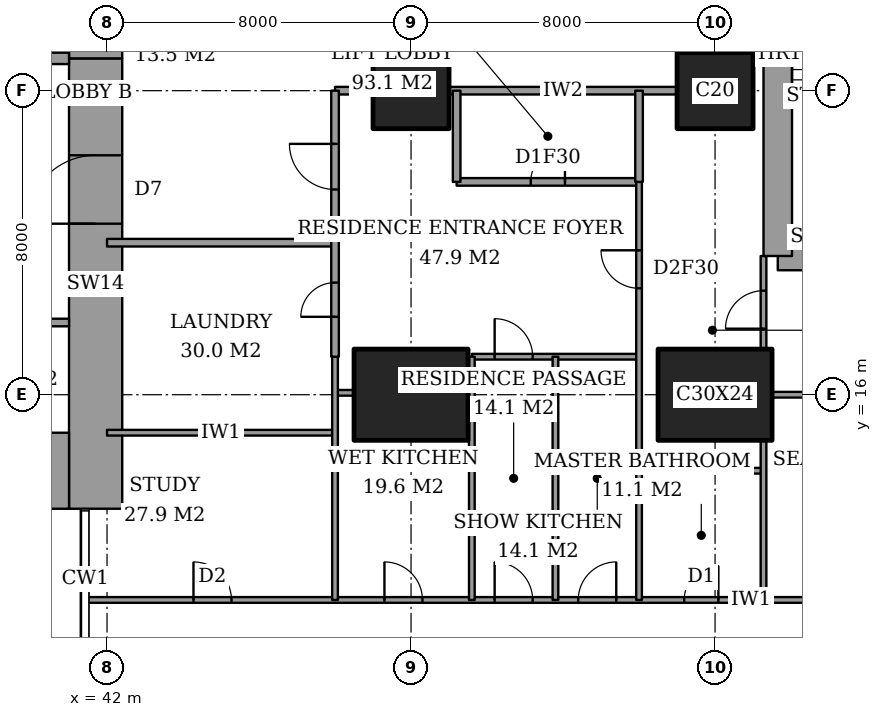
"""IFC4 building model, lengths in metres.
Left out: names, types, materials, properties, quantities, classifications, styles, units other than length and angle.
Written with IfcOpenShell. Run it as: python <this file> out.ifc"""

import sys

from ifc_helpers import new_model, si_unit, direction, frame, frame_2d, origin, origin_2d, place, context, subcontext, project, spatial, rectangle, extrude, element, fill, save


model = new_model("IFC4")
c1 = context("Model", 3, precision=1e-05, world=origin(), true_north=direction((0.0, 1.0)))
c2 = subcontext(c1, "Body", "Model", "MODEL_VIEW")
j1 = project(units=[si_unit("LENGTHUNIT", "METRE"), si_unit("PLANEANGLEUNIT", "RADIAN")], contexts=[c1])
p1 = place(None, origin())
s1 = spatial("IfcSite", under=j1, at=p1, CompositionType="ELEMENT")
p2 = place(p1, origin())
s2 = spatial("IfcBuilding", under=s1, at=p2, CompositionType="ELEMENT")
p3 = place(p2, frame((0.0, 0.0, 69.2)))
s3 = spatial("IfcBuildingStorey", under=s2, at=p3, CompositionType="ELEMENT", Elevation=69.2)
p4 = place(p3, frame((50.0, 16.0, 0.0), z_axis=(0.0, 0.0, 1.0), x_axis=(1.0, 0.0, 0.0)))
e1 = element("IfcColumn", 1, at=p4, inside=s3, PredefinedType="COLUMN", context=c2, shape_type="SweptSolid", body=[
    extrude(rectangle(XDim=3.0, YDim=2.4, at=origin_2d()), origin(), (0.0, 0.0, 1.0), 3.6),
])
p5 = place(p3, frame((50.0, 24.0, 0.0), z_axis=(0.0, 0.0, 1.0), x_axis=(1.0, 0.0, 0.0)))
e2 = element("IfcColumn", 2, at=p5, inside=s3, PredefinedType="COLUMN", context=c2, shape_type="SweptSolid", body=[
    extrude(rectangle(XDim=2.0, YDim=2.0, at=origin_2d()), origin(), (0.0, 0.0, 1.0), 3.6),
])
p6 = place(p3, frame((58.0, 16.0, 0.0), z_axis=(0.0, 0.0, 1.0), x_axis=(1.0, 0.0, 0.0)))
e3 = element("IfcColumn", 3, at=p6, inside=s3, PredefinedType="COLUMN", context=c2, shape_type="SweptSolid", body=[
    extrude(rectangle(XDim=3.0, YDim=2.4, at=origin_2d()), origin(), (0.0, 0.0, 1.0), 3.6),
])
p7 = place(p3, frame((58.0, 24.0, 0.0), z_axis=(0.0, 0.0, 1.0), x_axis=(1.0, 0.0, 0.0)))
e4 = element("IfcColumn", 4, at=p7, inside=s3, PredefinedType="COLUMN", context=c2, shape_type="SweptSolid", body=[
    extrude(rectangle(XDim=2.0, YDim=2.0, at=origin_2d()), origin(), (0.0, 0.0, 1.0), 3.6),
])
p8 = place(p3, frame((37.85, 14.0, 0.0), z_axis=(0.0, 0.0, 1.0), x_axis=(1.0, 0.0, 0.0)))
e5 = element("IfcWall", 5, at=p8, inside=s3, PredefinedType="SHEAR", context=c2, shape_type="SweptSolid", body=[
    extrude(rectangle(XDim=3.15, YDim=2.0, at=frame_2d((1.575, 0.0))), origin(), (0.0, 0.0, 1.0), 3.6),
])
p9 = place(p3, frame((41.7, 13.0, 0.0), z_axis=(0.0, 0.0, 1.0), x_axis=(0.0, 1.0, 0.0)))
e6 = element("IfcWall", 6, at=p9, inside=s3, PredefinedType="SHEAR", context=c2, shape_type="SweptSolid", body=[
    extrude(rectangle(XDim=11.85, YDim=1.4, at=frame_2d((5.925, 0.0))), origin(), (0.0, 0.0, 1.0), 3.6),
])
p10 = place(p9, frame((7.5, 0.0, 0.0)))
e7 = element("IfcOpeningElement", 7, at=p10, cuts=e6, PredefinedType="OPENING", context=c2, shape_type="SweptSolid", body=[
    extrude(rectangle(XDim=1.8, YDim=2.4, at=frame_2d((0.9, 1.2))), frame((0.0, 0.71, 0.0), z_axis=(0.0, -1.0, 0.0), x_axis=(1.0, 0.0, 0.0)), (0.0, 0.0, 1.0), 1.42),
])
p11 = place(p3, frame((41.7, 24.85, 0.0), z_axis=(0.0, 0.0, 1.0), x_axis=(0.0, 1.0, 0.0)))
e8 = element("IfcWall", 8, at=p11, inside=s3, PredefinedType="SHEAR", context=c2, shape_type="SweptSolid", body=[
    extrude(rectangle(XDim=10.15, YDim=1.4, at=frame_2d((5.075, 0.0))), origin(), (0.0, 0.0, 1.0), 3.6),
])
p12 = place(p3, frame((37.85, 24.85, 0.0), z_axis=(0.0, 0.0, 1.0), x_axis=(1.0, 0.0, 0.0)))
e9 = element("IfcWall", 9, at=p12, inside=s3, PredefinedType="SHEAR", context=c2, shape_type="SweptSolid", body=[
    extrude(rectangle(XDim=3.15, YDim=0.3, at=frame_2d((1.575, 0.0))), origin(), (0.0, 0.0, 1.0), 3.6),
])
p13 = place(p12, frame((0.95, 0.0, 0.0)))
e10 = element("IfcOpeningElement", 10, at=p13, cuts=e9, PredefinedType="OPENING", context=c2, shape_type="SweptSolid", body=[
    extrude(rectangle(XDim=1.0, YDim=2.1, at=frame_2d((0.5, 1.05))), frame((0.0, 0.16, 0.0), z_axis=(0.0, -1.0, 0.0), x_axis=(1.0, 0.0, 0.0)), (0.0, 0.0, 1.0), 0.32),
])
p14 = place(p3, frame((59.65, 19.65, 0.0), z_axis=(0.0, 0.0, 1.0), x_axis=(1.0, 0.0, 0.0)))
e11 = element("IfcWall", 11, at=p14, inside=s3, PredefinedType="SHEAR", context=c2, shape_type="SweptSolid", body=[
    extrude(rectangle(XDim=4.45, YDim=0.75, at=frame_2d((2.225, 0.0))), origin(), (0.0, 0.0, 1.0), 3.6),
])
p15 = place(p3, frame((59.65, 28.35, 0.0), z_axis=(0.0, 0.0, 1.0), x_axis=(0.0, -1.0, 0.0)))
e12 = element("IfcWall", 12, at=p15, inside=s3, PredefinedType="SHEAR", context=c2, shape_type="SweptSolid", body=[
    extrude(rectangle(XDim=8.7, YDim=0.75, at=frame_2d((4.35, 0.0))), origin(), (0.0, 0.0, 1.0), 3.6),
])
p16 = place(p15, frame((0.975, 0.0, 0.0)))
e13 = element("IfcOpeningElement", 13, at=p16, cuts=e12, PredefinedType="OPENING", context=c2, shape_type="SweptSolid", body=[
    extrude(rectangle(XDim=1.0, YDim=2.1, at=frame_2d((0.5, 1.05))), frame((0.0, 0.385, 0.0), z_axis=(0.0, -1.0, 0.0), x_axis=(1.0, 0.0, 0.0)), (0.0, 0.0, 1.0), 0.77),
])
p17 = place(p3, frame((41.439, 10.6, 0.0), z_axis=(0.0, 0.0, 1.0), x_axis=(1.0, 0.0, 0.0)))
e14 = element("IfcWall", 14, at=p17, inside=s3, PredefinedType="PARTITIONING", context=c2, shape_type="SweptSolid", body=[
    extrude(rectangle(XDim=25.011, YDim=0.15, at=frame_2d((12.505, 0.0))), origin(), (0.0, 0.0, 1.0), 3.35),
])
p18 = place(p17, frame((10.761, 0.0, 0.0)))
e15 = element("IfcOpeningElement", 15, at=p18, cuts=e14, PredefinedType="OPENING", context=c2, shape_type="SweptSolid", body=[
    extrude(rectangle(XDim=1.0, YDim=2.1, at=frame_2d((0.5, 1.05))), frame((0.0, 0.085, 0.0), z_axis=(0.0, -1.0, 0.0), x_axis=(1.0, 0.0, 0.0)), (0.0, 0.0, 1.0), 0.17),
])
p19 = place(p17, frame((20.924, 0.0, 0.0)))
e16 = element("IfcOpeningElement", 16, at=p19, cuts=e14, PredefinedType="OPENING", context=c2, shape_type="SweptSolid", body=[
    extrude(rectangle(XDim=1.0, YDim=2.1, at=frame_2d((0.5, 1.05))), frame((0.0, 0.085, 0.0), z_axis=(0.0, -1.0, 0.0), x_axis=(1.0, 0.0, 0.0)), (0.0, 0.0, 1.0), 0.17),
])
p20 = place(p17, frame((15.749, 0.0, 0.0)))
e17 = element("IfcOpeningElement", 17, at=p20, cuts=e14, PredefinedType="OPENING", context=c2, shape_type="SweptSolid", body=[
    extrude(rectangle(XDim=0.9, YDim=2.1, at=frame_2d((0.45, 1.05))), frame((0.0, 0.085, 0.0), z_axis=(0.0, -1.0, 0.0), x_axis=(1.0, 0.0, 0.0)), (0.0, 0.0, 1.0), 0.17),
])
p21 = place(p17, frame((12.961, 0.0, 0.0)))
e18 = element("IfcOpeningElement", 18, at=p21, cuts=e14, PredefinedType="OPENING", context=c2, shape_type="SweptSolid", body=[
    extrude(rectangle(XDim=1.0, YDim=2.1, at=frame_2d((0.5, 1.05))), frame((0.0, 0.085, 0.0), z_axis=(0.0, -1.0, 0.0), x_axis=(1.0, 0.0, 0.0)), (0.0, 0.0, 1.0), 0.17),
])
p22 = place(p17, frame((7.861, 0.0, 0.0)))
e19 = element("IfcOpeningElement", 19, at=p22, cuts=e14, PredefinedType="OPENING", context=c2, shape_type="SweptSolid", body=[
    extrude(rectangle(XDim=1.0, YDim=2.1, at=frame_2d((0.5, 1.05))), frame((0.0, 0.085, 0.0), z_axis=(0.0, -1.0, 0.0), x_axis=(1.0, 0.0, 0.0)), (0.0, 0.0, 1.0), 0.17),
])
p23 = place(p17, frame((2.836, 0.0, 0.0)))
e20 = element("IfcOpeningElement", 20, at=p23, cuts=e14, PredefinedType="OPENING", context=c2, shape_type="SweptSolid", body=[
    extrude(rectangle(XDim=1.0, YDim=2.1, at=frame_2d((0.5, 1.05))), frame((0.0, 0.085, 0.0), z_axis=(0.0, -1.0, 0.0), x_axis=(1.0, 0.0, 0.0)), (0.0, 0.0, 1.0), 0.17),
])
p24 = place(p3, frame((56.0, 14.0, 0.0), z_axis=(0.0, 0.0, 1.0), x_axis=(1.0, 0.0, 0.0)))
e21 = element("IfcWall", 21, at=p24, inside=s3, PredefinedType="PARTITIONING", context=c2, shape_type="SweptSolid", body=[
    extrude(rectangle(XDim=3.275, YDim=0.15, at=frame_2d((1.637, 0.0))), origin(), (0.0, 0.0, 1.0), 3.35),
])
p25 = place(p3, frame((42.0, 15.0, 0.0), z_axis=(0.0, 0.0, 1.0), x_axis=(1.0, 0.0, 0.0)))
e22 = element("IfcWall", 22, at=p25, inside=s3, PredefinedType="PARTITIONING", context=c2, shape_type="SweptSolid", body=[
    extrude(rectangle(XDim=6.0, YDim=0.15, at=frame_2d((3.0, 0.0))), origin(), (0.0, 0.0, 1.0), 3.35),
])
p26 = place(p3, frame((59.5, 16.0, 0.0), z_axis=(0.0, 0.0, 1.0), x_axis=(1.0, 0.0, 0.0)))
e23 = element("IfcWall", 23, at=p26, inside=s3, PredefinedType="PARTITIONING", context=c2, shape_type="SweptSolid", body=[
    extrude(rectangle(XDim=5.15, YDim=0.15, at=frame_2d((2.575, 0.0))), origin(), (0.0, 0.0, 1.0), 2.634),
])
p27 = place(p3, frame((48.0, 16.05, 0.0), z_axis=(0.0, 0.0, 1.0), x_axis=(1.0, 0.0, 0.0)))
e24 = element("IfcWall", 24, at=p27, inside=s3, PredefinedType="PARTITIONING", context=c2, shape_type="SweptSolid", body=[
    extrude(rectangle(XDim=0.5, YDim=0.15, at=frame_2d((0.25, 0.0))), origin(), (0.0, 0.0, 1.0), 2.634),
])
p28 = place(p3, frame((51.6, 17.0, 0.0), z_axis=(0.0, 0.0, 1.0), x_axis=(1.0, 0.0, 0.0)))
e25 = element("IfcWall", 25, at=p28, inside=s3, PredefinedType="PARTITIONING", context=c2, shape_type="SweptSolid", body=[
    extrude(rectangle(XDim=4.4, YDim=0.15, at=frame_2d((2.2, 0.0))), origin(), (0.0, 0.0, 1.0), 3.35),
])
p29 = place(p28, frame((0.6, 0.0, 0.0)))
e26 = element("IfcOpeningElement", 26, at=p29, cuts=e25, PredefinedType="OPENING", context=c2, shape_type="SweptSolid", body=[
    extrude(rectangle(XDim=1.0, YDim=2.1, at=frame_2d((0.5, 1.05))), frame((0.0, 0.085, 0.0), z_axis=(0.0, -1.0, 0.0), x_axis=(1.0, 0.0, 0.0)), (0.0, 0.0, 1.0), 0.17),
])
p30 = place(p3, frame((42.0, 20.0, 0.0), z_axis=(0.0, 0.0, 1.0), x_axis=(1.0, 0.0, 0.0)))
e27 = element("IfcWall", 27, at=p30, inside=s3, PredefinedType="PARTITIONING", context=c2, shape_type="SweptSolid", body=[
    extrude(rectangle(XDim=6.0, YDim=0.2, at=frame_2d((3.0, 0.0))), origin(), (0.0, 0.0, 1.0), 3.35),
])
p31 = place(p3, frame((51.2, 21.6, 0.0), z_axis=(0.0, 0.0, 1.0), x_axis=(1.0, 0.0, 0.0)))
e28 = element("IfcWall", 28, at=p31, inside=s3, PredefinedType="PARTITIONING", context=c2, shape_type="SweptSolid", body=[
    extrude(rectangle(XDim=4.8, YDim=0.2, at=frame_2d((2.4, 0.0))), origin(), (0.0, 0.0, 1.0), 3.35),
])
p32 = place(p31, frame((1.95, 0.0, 0.0)))
e29 = element("IfcOpeningElement", 29, at=p32, cuts=e28, PredefinedType="OPENING", context=c2, shape_type="SweptSolid", body=[
    extrude(rectangle(XDim=0.9, YDim=2.1, at=frame_2d((0.45, 1.05))), frame((0.0, 0.11, 0.0), z_axis=(0.0, -1.0, 0.0), x_axis=(1.0, 0.0, 0.0)), (0.0, 0.0, 1.0), 0.22),
])
p33 = place(p3, frame((48.0, 24.0, 0.0), z_axis=(0.0, 0.0, 1.0), x_axis=(1.0, 0.0, 0.0)))
e30 = element("IfcWall", 30, at=p33, inside=s3, PredefinedType="PARTITIONING", context=c2, shape_type="SweptSolid", body=[
    extrude(rectangle(XDim=1.0, YDim=0.2, at=frame_2d((0.5, 0.0))), origin(), (0.0, 0.0, 1.0), 3.35),
])
p34 = place(p3, frame((51.0, 24.0, 0.0), z_axis=(0.0, 0.0, 1.0), x_axis=(1.0, 0.0, 0.0)))
e31 = element("IfcWall", 31, at=p34, inside=s3, PredefinedType="PARTITIONING", context=c2, shape_type="SweptSolid", body=[
    extrude(rectangle(XDim=6.0, YDim=0.2, at=frame_2d((3.0, 0.0))), origin(), (0.0, 0.0, 1.0), 3.35),
])
p35 = place(p3, frame((48.0, 17.0, 0.0), z_axis=(0.0, 0.0, 1.0), x_axis=(0.0, 1.0, 0.0)))
e32 = element("IfcWall", 32, at=p35, inside=s3, PredefinedType="PARTITIONING", context=c2, shape_type="SweptSolid", body=[
    extrude(rectangle(XDim=7.0, YDim=0.2, at=frame_2d((3.5, 0.0))), origin(), (0.0, 0.0, 1.0), 3.35),
])
p36 = place(p35, frame((4.4, 0.0, 0.0)))
e33 = element("IfcOpeningElement", 33, at=p36, cuts=e32, PredefinedType="OPENING", context=c2, shape_type="SweptSolid", body=[
    extrude(rectangle(XDim=1.2, YDim=2.4, at=frame_2d((0.6, 1.2))), frame((0.0, 0.11, 0.0), z_axis=(0.0, -1.0, 0.0), x_axis=(1.0, 0.0, 0.0)), (0.0, 0.0, 1.0), 0.22),
])
p37 = place(p35, frame((1.05, 0.0, 0.0)))
e34 = element("IfcOpeningElement", 34, at=p37, cuts=e32, PredefinedType="OPENING", context=c2, shape_type="SweptSolid", body=[
    extrude(rectangle(XDim=0.9, YDim=2.1, at=frame_2d((0.45, 1.05))), frame((0.0, 0.11, 0.0), z_axis=(0.0, -1.0, 0.0), x_axis=(1.0, 0.0, 0.0)), (0.0, 0.0, 1.0), 0.22),
])
p38 = place(p3, frame((48.0, 10.6, 0.0), z_axis=(0.0, 0.0, 1.0), x_axis=(0.0, 1.0, 0.0)))
e35 = element("IfcWall", 35, at=p38, inside=s3, PredefinedType="PARTITIONING", context=c2, shape_type="SweptSolid", body=[
    extrude(rectangle(XDim=6.4, YDim=0.15, at=frame_2d((3.2, 0.0))), origin(), (0.0, 0.0, 1.0), 3.35),
])
p39 = place(p3, frame((51.2, 21.6, 0.0), z_axis=(0.0, 0.0, 1.0), x_axis=(0.0, 1.0, 0.0)))
e36 = element("IfcWall", 36, at=p39, inside=s3, PredefinedType="PARTITIONING", context=c2, shape_type="SweptSolid", body=[
    extrude(rectangle(XDim=2.4, YDim=0.2, at=frame_2d((1.2, 0.0))), origin(), (0.0, 0.0, 1.0), 3.35),
])
for number, where, z_axis, x_axis in (
    (37, (51.6, 10.6, 0.0), (0.0, 0.0, 1.0), (0.0, 1.0, 0.0)),
    (38, (53.8, 10.6, 0.0), (0.0, 0.0, 1.0), (0.0, 1.0, 0.0)),
):
    element("IfcWall", number, at=place(p3, frame(where, z_axis=z_axis, x_axis=x_axis)), inside=s3, PredefinedType="PARTITIONING", context=c2, shape_type="SweptSolid", body=[
        extrude(rectangle(XDim=6.4, YDim=0.15, at=frame_2d((3.2, 0.0))), origin(), (0.0, 0.0, 1.0), 3.35),
    ])
p40 = place(p3, frame((56.0, 21.6, 0.0), z_axis=(0.0, 0.0, 1.0), x_axis=(0.0, 1.0, 0.0)))
e39 = element("IfcWall", 39, at=p40, inside=s3, PredefinedType="PARTITIONING", context=c2, shape_type="SweptSolid", body=[
    extrude(rectangle(XDim=2.4, YDim=0.2, at=frame_2d((1.2, 0.0))), origin(), (0.0, 0.0, 1.0), 3.35),
])
p41 = place(p3, frame((56.0, 10.6, 0.0), z_axis=(0.0, 0.0, 1.0), x_axis=(0.0, 1.0, 0.0)))
e40 = element("IfcWall", 40, at=p41, inside=s3, PredefinedType="PARTITIONING", context=c2, shape_type="SweptSolid", body=[
    extrude(rectangle(XDim=11.0, YDim=0.15, at=frame_2d((5.5, 0.0))), origin(), (0.0, 0.0, 1.0), 3.35),
])
p42 = place(p41, frame((8.2, 0.0, 0.0)))
e41 = element("IfcOpeningElement", 41, at=p42, cuts=e40, PredefinedType="OPENING", context=c2, shape_type="SweptSolid", body=[
    extrude(rectangle(XDim=1.0, YDim=2.1, at=frame_2d((0.5, 1.05))), frame((0.0, 0.085, 0.0), z_axis=(0.0, -1.0, 0.0), x_axis=(1.0, 0.0, 0.0)), (0.0, 0.0, 1.0), 0.17),
])
p43 = place(p3, frame((59.275, 10.6, 0.0), z_axis=(0.0, 0.0, 1.0), x_axis=(0.0, 1.0, 0.0)))
e42 = element("IfcWall", 42, at=p43, inside=s3, PredefinedType="PARTITIONING", context=c2, shape_type="SweptSolid", body=[
    extrude(rectangle(XDim=4.2, YDim=0.15, at=frame_2d((2.1, 0.0))), origin(), (0.0, 0.0, 1.0), 3.35),
])
p44 = place(p3, frame((59.275, 17.2, 0.0), z_axis=(0.0, 0.0, 1.0), x_axis=(0.0, 1.0, 0.0)))
e43 = element("IfcWall", 43, at=p44, inside=s3, PredefinedType="PARTITIONING", context=c2, shape_type="SweptSolid", body=[
    extrude(rectangle(XDim=2.45, YDim=0.15, at=frame_2d((1.225, 0.0))), origin(), (0.0, 0.0, 1.0), 3.35),
])
p45 = place(p44, frame((0.538, 0.0, 0.0)))
e44 = element("IfcOpeningElement", 44, at=p45, cuts=e43, PredefinedType="OPENING", context=c2, shape_type="SweptSolid", body=[
    extrude(rectangle(XDim=1.0, YDim=2.1, at=frame_2d((0.5, 1.05))), frame((0.0, 0.085, 0.0), z_axis=(0.0, -1.0, 0.0), x_axis=(1.0, 0.0, 0.0)), (0.0, 0.0, 1.0), 0.17),
])
p46 = place(p3, frame((28.3, 17.9, 0.0), z_axis=(0.0, 0.0, 1.0), x_axis=(1.0, 0.0, 0.0)))
e45 = element("IfcWall", 45, at=p46, inside=s3, PredefinedType="PARTITIONING", context=c2, shape_type="SweptSolid", body=[
    extrude(rectangle(XDim=12.7, YDim=0.2, at=frame_2d((6.35, 0.0))), origin(), (0.0, 0.0, 1.0), 3.6),
])
p47 = place(p46, frame((0.95, 0.0, 0.0)))
e46 = element("IfcOpeningElement", 46, at=p47, cuts=e45, PredefinedType="OPENING", context=c2, shape_type="SweptSolid", body=[
    extrude(rectangle(XDim=1.1, YDim=2.1, at=frame_2d((0.55, 1.05))), frame((0.0, 0.11, 0.0), z_axis=(0.0, -1.0, 0.0), x_axis=(1.0, 0.0, 0.0)), (0.0, 0.0, 1.0), 0.22),
])
p48 = place(p46, frame((4.15, 0.0, 0.0)))
e47 = element("IfcOpeningElement", 47, at=p48, cuts=e45, PredefinedType="OPENING", context=c2, shape_type="SweptSolid", body=[
    extrude(rectangle(XDim=1.1, YDim=2.1, at=frame_2d((0.55, 1.05))), frame((0.0, 0.11, 0.0), z_axis=(0.0, -1.0, 0.0), x_axis=(1.0, 0.0, 0.0)), (0.0, 0.0, 1.0), 0.22),
])
p49 = place(p46, frame((7.35, 0.0, 0.0)))
e48 = element("IfcOpeningElement", 48, at=p49, cuts=e45, PredefinedType="OPENING", context=c2, shape_type="SweptSolid", body=[
    extrude(rectangle(XDim=1.1, YDim=2.1, at=frame_2d((0.55, 1.05))), frame((0.0, 0.11, 0.0), z_axis=(0.0, -1.0, 0.0), x_axis=(1.0, 0.0, 0.0)), (0.0, 0.0, 1.0), 0.22),
])
p50 = place(p46, frame((10.6, 0.0, 0.0)))
e49 = element("IfcOpeningElement", 49, at=p50, cuts=e45, PredefinedType="OPENING", context=c2, shape_type="SweptSolid", body=[
    extrude(rectangle(XDim=1.2, YDim=2.1, at=frame_2d((0.6, 1.05))), frame((0.0, 0.11, 0.0), z_axis=(0.0, -1.0, 0.0), x_axis=(1.0, 0.0, 0.0)), (0.0, 0.0, 1.0), 0.22),
])
p51 = place(p18, origin())
e50 = element("IfcDoor", 50, at=p51, inside=s3, OperationType="SINGLE_SWING_RIGHT", PredefinedType="DOOR", context=c2, shape_type="SweptSolid", body=[
    extrude(rectangle(XDim=1.0, YDim=2.1, at=frame_2d((0.5, 1.05))), frame((0.0, 0.025, 0.0), z_axis=(0.0, -1.0, 0.0), x_axis=(1.0, 0.0, 0.0)), (0.0, 0.0, 1.0), 0.05),
])
fill(e15, e50)
p52 = place(p45, origin())
e51 = element("IfcDoor", 51, at=p52, inside=s3, OperationType="SINGLE_SWING_RIGHT", PredefinedType="DOOR", context=c2, shape_type="SweptSolid", body=[
    extrude(rectangle(XDim=1.0, YDim=2.1, at=frame_2d((0.5, 1.05))), frame((0.0, 0.025, 0.0), z_axis=(0.0, -1.0, 0.0), x_axis=(1.0, 0.0, 0.0)), (0.0, 0.0, 1.0), 0.05),
])
fill(e44, e51)
p53 = place(p20, origin())
e52 = element("IfcDoor", 52, at=p53, inside=s3, OperationType="SINGLE_SWING_LEFT", PredefinedType="DOOR", context=c2, shape_type="SweptSolid", body=[
    extrude(rectangle(XDim=0.9, YDim=2.1, at=frame_2d((0.45, 1.05))), frame((0.0, 0.025, 0.0), z_axis=(0.0, -1.0, 0.0), x_axis=(1.0, 0.0, 0.0)), (0.0, 0.0, 1.0), 0.05),
])
fill(e17, e52)
p54 = place(p42, origin())
e53 = element("IfcDoor", 53, at=p54, inside=s3, OperationType="SINGLE_SWING_LEFT", PredefinedType="DOOR", context=c2, shape_type="SweptSolid", body=[
    extrude(rectangle(XDim=1.0, YDim=2.1, at=frame_2d((0.5, 1.05))), frame((0.0, 0.025, 0.0), z_axis=(0.0, -1.0, 0.0), x_axis=(1.0, 0.0, 0.0)), (0.0, 0.0, 1.0), 0.05),
])
fill(e41, e53)
p55 = place(p32, origin())
e54 = element("IfcDoor", 54, at=p55, inside=s3, OperationType="SINGLE_SWING_LEFT", PredefinedType="DOOR", context=c2, shape_type="SweptSolid", body=[
    extrude(rectangle(XDim=0.9, YDim=2.1, at=frame_2d((0.45, 1.05))), frame((0.0, 0.025, 0.0), z_axis=(0.0, -1.0, 0.0), x_axis=(1.0, 0.0, 0.0)), (0.0, 0.0, 1.0), 0.05),
])
fill(e29, e54)
p56 = place(p36, origin())
e55 = element("IfcDoor", 55, at=p56, inside=s3, OperationType="SINGLE_SWING_LEFT", PredefinedType="DOOR", context=c2, shape_type="SweptSolid", body=[
    extrude(rectangle(XDim=1.2, YDim=2.4, at=frame_2d((0.6, 1.2))), frame((0.0, 0.025, 0.0), z_axis=(0.0, -1.0, 0.0), x_axis=(1.0, 0.0, 0.0)), (0.0, 0.0, 1.0), 0.05),
])
fill(e33, e55)
p57 = place(p21, origin())
e56 = element("IfcDoor", 56, at=p57, inside=s3, OperationType="SINGLE_SWING_LEFT", PredefinedType="DOOR", context=c2, shape_type="SweptSolid", body=[
    extrude(rectangle(XDim=1.0, YDim=2.1, at=frame_2d((0.5, 1.05))), frame((0.0, 0.025, 0.0), z_axis=(0.0, -1.0, 0.0), x_axis=(1.0, 0.0, 0.0)), (0.0, 0.0, 1.0), 0.05),
])
fill(e18, e56)
p58 = place(p29, origin())
e57 = element("IfcDoor", 57, at=p58, inside=s3, OperationType="SINGLE_SWING_RIGHT", PredefinedType="DOOR", context=c2, shape_type="SweptSolid", body=[
    extrude(rectangle(XDim=1.0, YDim=2.1, at=frame_2d((0.5, 1.05))), frame((0.0, 0.025, 0.0), z_axis=(0.0, -1.0, 0.0), x_axis=(1.0, 0.0, 0.0)), (0.0, 0.0, 1.0), 0.05),
])
fill(e26, e57)
p59 = place(p22, origin())
e58 = element("IfcDoor", 58, at=p59, inside=s3, OperationType="SINGLE_SWING_RIGHT", PredefinedType="DOOR", context=c2, shape_type="SweptSolid", body=[
    extrude(rectangle(XDim=1.0, YDim=2.1, at=frame_2d((0.5, 1.05))), frame((0.0, 0.025, 0.0), z_axis=(0.0, -1.0, 0.0), x_axis=(1.0, 0.0, 0.0)), (0.0, 0.0, 1.0), 0.05),
])
fill(e19, e58)
p60 = place(p23, origin())
e59 = element("IfcDoor", 59, at=p60, inside=s3, OperationType="SINGLE_SWING_RIGHT", PredefinedType="DOOR", context=c2, shape_type="SweptSolid", body=[
    extrude(rectangle(XDim=1.0, YDim=2.1, at=frame_2d((0.5, 1.05))), frame((0.0, 0.025, 0.0), z_axis=(0.0, -1.0, 0.0), x_axis=(1.0, 0.0, 0.0)), (0.0, 0.0, 1.0), 0.05),
])
fill(e20, e59)
p61 = place(p37, origin())
e60 = element("IfcDoor", 60, at=p61, inside=s3, OperationType="SINGLE_SWING_RIGHT", PredefinedType="DOOR", context=c2, shape_type="SweptSolid", body=[
    extrude(rectangle(XDim=0.9, YDim=2.1, at=frame_2d((0.45, 1.05))), frame((0.0, 0.025, 0.0), z_axis=(0.0, -1.0, 0.0), x_axis=(1.0, 0.0, 0.0)), (0.0, 0.0, 1.0), 0.05),
])
fill(e34, e60)
p62 = place(p10, origin())
e61 = element("IfcDoor", 61, at=p62, inside=s3, OperationType="DOUBLE_DOOR_DOUBLE_SWING", PredefinedType="DOOR", context=c2, shape_type="SweptSolid", body=[
    extrude(rectangle(XDim=1.8, YDim=2.4, at=frame_2d((0.9, 1.2))), frame((0.0, 0.025, 0.0), z_axis=(0.0, -1.0, 0.0), x_axis=(1.0, 0.0, 0.0)), (0.0, 0.0, 1.0), 0.05),
])
fill(e7, e61)
save(model, sys.argv[1])
